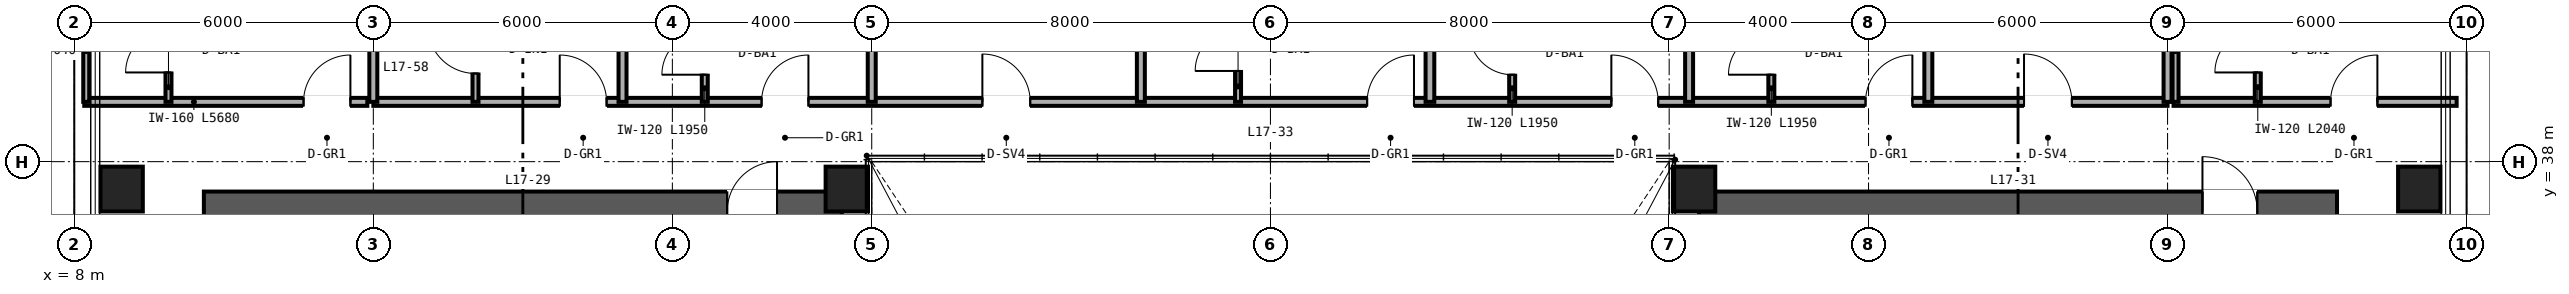
"""IFC4 building model, lengths in metres.
Left out: names, types, materials, properties, quantities, classifications, styles, units other than length and angle.
Written with IfcOpenShell. Run it as: python <this file> out.ifc"""

import sys

from ifc_helpers import new_model, si_unit, direction, frame, frame_2d, origin, origin_2d, place, context, subcontext, project, spatial, rectangle, hollow_rectangle, extrude, source, transform, mapped, element, fill, save


model = new_model("IFC4")
c1 = context("Model", 3, precision=1e-05, world=origin(), true_north=direction((0.0, 1.0)))
c2 = subcontext(c1, "Body", "Model", "MODEL_VIEW")
j1 = project(units=[si_unit("LENGTHUNIT", "METRE"), si_unit("PLANEANGLEUNIT", "RADIAN")], contexts=[c1])
p1 = place(None, origin())
s1 = spatial("IfcSite", under=j1, at=p1, CompositionType="ELEMENT")
p2 = place(p1, origin())
s2 = spatial("IfcBuilding", under=s1, at=p2, CompositionType="ELEMENT")
p3 = place(p2, frame((0.0, 0.0, 70.8)))
s3 = spatial("IfcBuildingStorey", under=s2, at=p3, CompositionType="ELEMENT", Elevation=70.8)
p4 = place(p3, frame((10.6, 37.0, 0.0), z_axis=(0.0, 0.0, 1.0), x_axis=(1.0, 0.0, 0.0)))
e1 = element("IfcWall", 1, at=p4, inside=s3, PredefinedType="SHEAR", context=c2, shape_type="SweptSolid", body=[
    extrude(rectangle(XDim=12.8, YDim=0.8, at=frame_2d((6.4, 0.0))), origin(), (0.0, 0.0, 1.0), 3.35),
])
p5 = place(p4, frame((10.5, 0.0, 0.0)))
e2 = element("IfcOpeningElement", 2, at=p5, cuts=e1, PredefinedType="OPENING", context=c2, shape_type="SweptSolid", body=[
    extrude(rectangle(XDim=1.0, YDim=2.15, at=frame_2d((0.5, 1.075))), frame((0.0, 0.41, 0.0), z_axis=(0.0, -1.0, 0.0), x_axis=(1.0, 0.0, 0.0)), (0.0, 0.0, 1.0), 0.82),
])
p6 = place(p3, frame((40.6, 37.0, 0.0), z_axis=(0.0, 0.0, 1.0), x_axis=(1.0, 0.0, 0.0)))
e3 = element("IfcWall", 3, at=p6, inside=s3, PredefinedType="SHEAR", context=c2, shape_type="SweptSolid", body=[
    extrude(rectangle(XDim=12.8, YDim=0.8, at=frame_2d((6.4, 0.0))), origin(), (0.0, 0.0, 1.0), 3.35),
])
p7 = place(p6, frame((10.1, 0.0, 0.0)))
e4 = element("IfcOpeningElement", 4, at=p7, cuts=e3, PredefinedType="OPENING", context=c2, shape_type="SweptSolid", body=[
    extrude(rectangle(XDim=1.1, YDim=2.15, at=frame_2d((0.55, 1.075))), frame((0.0, 0.41, 0.0), z_axis=(0.0, -1.0, 0.0), x_axis=(1.0, 0.0, 0.0)), (0.0, 0.0, 1.0), 0.82),
])
m1 = source(origin(), c2, "Body", "SweptSolid", [
    extrude(hollow_rectangle(XDim=0.85, YDim=0.9, WallThickness=0.04, at=origin_2d()), origin(), (0.0, 0.0, 1.0), 3.35),
])
for number, where, z_axis, x_axis in (
    (5, (8.95, 37.45, 0.0), (0.0, 0.0, 1.0), (1.0, 0.0, 0.0)),
    (6, (23.5, 37.45, 0.0), (0.0, 0.0, 1.0), (1.0, 0.0, 0.0)),
    (7, (40.5, 37.45, 0.0), (0.0, 0.0, 1.0), (1.0, 0.0, 0.0)),
    (8, (55.05, 37.45, 0.0), (0.0, 0.0, 1.0), (1.0, 0.0, 0.0)),
):
    element("IfcColumn", number, at=place(p3, frame(where, z_axis=z_axis, x_axis=x_axis)), inside=s3, PredefinedType="COLUMN", context=c2, shape_type="MappedRepresentation", body=[
        mapped(m1, transform((0.0, 0.0, 0.0), scale=1.0)),
    ])
p8 = place(p3, frame((8.2, 39.2, 0.0), z_axis=(0.0, 0.0, 1.0), x_axis=(1.0, 0.0, 0.0)))
e9 = element("IfcWall", 9, at=p8, inside=s3, PredefinedType="PARTITIONING", context=c2, shape_type="SweptSolid", body=[
    extrude(rectangle(XDim=5.68, YDim=0.16, at=frame_2d((2.84, 0.0))), origin(), (0.0, 0.0, 1.0), 3.35),
])
p9 = place(p8, frame((4.4, 0.0, 0.0)))
e10 = element("IfcOpeningElement", 10, at=p9, cuts=e9, PredefinedType="OPENING", context=c2, shape_type="SweptSolid", body=[
    extrude(rectangle(XDim=0.94, YDim=2.15, at=frame_2d((0.47, 1.075))), frame((0.0, 0.09, 0.0), z_axis=(0.0, -1.0, 0.0), x_axis=(1.0, 0.0, 0.0)), (0.0, 0.0, 1.0), 0.18),
])
p10 = place(p3, frame((9.89, 39.2, 0.0), z_axis=(0.0, 0.0, 1.0), x_axis=(0.0, 1.0, 0.0)))
e11 = element("IfcWall", 11, at=p10, inside=s3, PredefinedType="PARTITIONING", context=c2, shape_type="SweptSolid", body=[
    extrude(rectangle(XDim=2.04, YDim=0.12, at=frame_2d((1.02, 0.0))), origin(), (0.0, 0.0, 1.0), 3.35),
])
p11 = place(p10, frame((0.59, 0.0, 0.0)))
e12 = element("IfcOpeningElement", 12, at=p11, cuts=e11, PredefinedType="OPENING", context=c2, shape_type="SweptSolid", body=[
    extrude(rectangle(XDim=0.86, YDim=2.1, at=frame_2d((0.43, 1.05))), frame((0.0, 0.07, 0.0), z_axis=(0.0, -1.0, 0.0), x_axis=(1.0, 0.0, 0.0)), (0.0, 0.0, 1.0), 0.14),
])
p12 = place(p3, frame((8.24, 39.2, 0.0), z_axis=(0.0, 0.0, 1.0), x_axis=(0.0, 1.0, 0.0)))
e13 = element("IfcWall", 13, at=p12, inside=s3, PredefinedType="PARTITIONING", context=c2, shape_type="SweptSolid", body=[
    extrude(rectangle(XDim=2.04, YDim=0.12, at=frame_2d((1.02, 0.0))), origin(), (0.0, 0.0, 1.0), 3.35),
])
p13 = place(p3, frame((50.12, 39.2, 0.0), z_axis=(0.0, 0.0, 1.0), x_axis=(1.0, 0.0, 0.0)))
e14 = element("IfcWall", 14, at=p13, inside=s3, PredefinedType="PARTITIONING", context=c2, shape_type="SweptSolid", body=[
    extrude(rectangle(XDim=5.68, YDim=0.16, at=frame_2d((2.84, 0.0))), origin(), (0.0, 0.0, 1.0), 3.35),
])
p14 = place(p13, frame((3.15, 0.0, 0.0)))
e15 = element("IfcOpeningElement", 15, at=p14, cuts=e14, PredefinedType="OPENING", context=c2, shape_type="SweptSolid", body=[
    extrude(rectangle(XDim=0.94, YDim=2.15, at=frame_2d((0.47, 1.075))), frame((0.0, 0.09, 0.0), z_axis=(0.0, -1.0, 0.0), x_axis=(1.0, 0.0, 0.0)), (0.0, 0.0, 1.0), 0.18),
])
p15 = place(p3, frame((51.81, 39.2, 0.0), z_axis=(0.0, 0.0, 1.0), x_axis=(0.0, 1.0, 0.0)))
e16 = element("IfcWall", 16, at=p15, inside=s3, PredefinedType="PARTITIONING", context=c2, shape_type="SweptSolid", body=[
    extrude(rectangle(XDim=2.04, YDim=0.12, at=frame_2d((1.02, 0.0))), origin(), (0.0, 0.0, 1.0), 3.35),
])
p16 = place(p15, frame((0.59, 0.0, 0.0)))
e17 = element("IfcOpeningElement", 17, at=p16, cuts=e16, PredefinedType="OPENING", context=c2, shape_type="SweptSolid", body=[
    extrude(rectangle(XDim=0.86, YDim=2.1, at=frame_2d((0.43, 1.05))), frame((0.0, 0.07, 0.0), z_axis=(0.0, -1.0, 0.0), x_axis=(1.0, 0.0, 0.0)), (0.0, 0.0, 1.0), 0.14),
])
p17 = place(p3, frame((50.16, 39.2, 0.0), z_axis=(0.0, 0.0, 1.0), x_axis=(0.0, 1.0, 0.0)))
e18 = element("IfcWall", 18, at=p17, inside=s3, PredefinedType="PARTITIONING", context=c2, shape_type="SweptSolid", body=[
    extrude(rectangle(XDim=2.04, YDim=0.12, at=frame_2d((1.02, 0.0))), origin(), (0.0, 0.0, 1.0), 3.35),
])
p18 = place(p3, frame((14.0, 39.2, 0.0), z_axis=(0.0, 0.0, 1.0), x_axis=(1.0, 0.0, 0.0)))
e19 = element("IfcWall", 19, at=p18, inside=s3, PredefinedType="PARTITIONING", context=c2, shape_type="SweptSolid", body=[
    extrude(rectangle(XDim=36.0, YDim=0.16, at=frame_2d((18.0, 0.0))), origin(), (0.0, 0.0, 1.0), 2.571),
])
p19 = place(p18, frame((3.74, 0.0, 0.0)))
e20 = element("IfcOpeningElement", 20, at=p19, cuts=e19, PredefinedType="OPENING", context=c2, shape_type="SweptSolid", body=[
    extrude(rectangle(XDim=0.94, YDim=2.15, at=frame_2d((0.47, 1.075))), frame((0.0, 0.09, 0.0), z_axis=(0.0, -1.0, 0.0), x_axis=(1.0, 0.0, 0.0)), (0.0, 0.0, 1.0), 0.18),
])
p20 = place(p18, frame((7.79, 0.0, 0.0)))
e21 = element("IfcOpeningElement", 21, at=p20, cuts=e19, PredefinedType="OPENING", context=c2, shape_type="SweptSolid", body=[
    extrude(rectangle(XDim=0.94, YDim=2.15, at=frame_2d((0.47, 1.075))), frame((0.0, 0.09, 0.0), z_axis=(0.0, -1.0, 0.0), x_axis=(1.0, 0.0, 0.0)), (0.0, 0.0, 1.0), 0.18),
])
p21 = place(p18, frame((12.22, 0.0, 0.0)))
e22 = element("IfcOpeningElement", 22, at=p21, cuts=e19, PredefinedType="OPENING", context=c2, shape_type="SweptSolid", body=[
    extrude(rectangle(XDim=0.96, YDim=2.15, at=frame_2d((0.48, 1.075))), frame((0.0, 0.09, 0.0), z_axis=(0.0, -1.0, 0.0), x_axis=(1.0, 0.0, 0.0)), (0.0, 0.0, 1.0), 0.18),
])
p22 = place(p18, frame((19.94, 0.0, 0.0)))
e23 = element("IfcOpeningElement", 23, at=p22, cuts=e19, PredefinedType="OPENING", context=c2, shape_type="SweptSolid", body=[
    extrude(rectangle(XDim=0.94, YDim=2.15, at=frame_2d((0.47, 1.075))), frame((0.0, 0.09, 0.0), z_axis=(0.0, -1.0, 0.0), x_axis=(1.0, 0.0, 0.0)), (0.0, 0.0, 1.0), 0.18),
])
p23 = place(p18, frame((24.84, 0.0, 0.0)))
e24 = element("IfcOpeningElement", 24, at=p23, cuts=e19, PredefinedType="OPENING", context=c2, shape_type="SweptSolid", body=[
    extrude(rectangle(XDim=0.94, YDim=2.15, at=frame_2d((0.47, 1.075))), frame((0.0, 0.09, 0.0), z_axis=(0.0, -1.0, 0.0), x_axis=(1.0, 0.0, 0.0)), (0.0, 0.0, 1.0), 0.18),
])
p24 = place(p18, frame((29.94, 0.0, 0.0)))
e25 = element("IfcOpeningElement", 25, at=p24, cuts=e19, PredefinedType="OPENING", context=c2, shape_type="SweptSolid", body=[
    extrude(rectangle(XDim=0.94, YDim=2.15, at=frame_2d((0.47, 1.075))), frame((0.0, 0.09, 0.0), z_axis=(0.0, -1.0, 0.0), x_axis=(1.0, 0.0, 0.0)), (0.0, 0.0, 1.0), 0.18),
])
p25 = place(p18, frame((33.12, 0.0, 0.0)))
e26 = element("IfcOpeningElement", 26, at=p25, cuts=e19, PredefinedType="OPENING", context=c2, shape_type="SweptSolid", body=[
    extrude(rectangle(XDim=0.96, YDim=2.15, at=frame_2d((0.48, 1.075))), frame((0.0, 0.09, 0.0), z_axis=(0.0, -1.0, 0.0), x_axis=(1.0, 0.0, 0.0)), (0.0, 0.0, 1.0), 0.18),
])
for number, where, z_axis, x_axis in (
    (27, (14.0, 39.2, 0.0), (0.0, 0.0, 1.0), (0.0, 1.0, 0.0)),
    (28, (50.0, 39.2, 0.0), (0.0, 0.0, 1.0), (0.0, 1.0, 0.0)),
    (29, (19.0, 39.2, 0.0), (0.0, 0.0, 1.0), (0.0, 1.0, 0.0)),
):
    element("IfcWall", number, at=place(p3, frame(where, z_axis=z_axis, x_axis=x_axis)), inside=s3, PredefinedType="PARTITIONING", context=c2, shape_type="SweptSolid", body=[
        extrude(rectangle(XDim=10.44, YDim=0.16, at=frame_2d((5.22, 0.0))), origin(), (0.0, 0.0, 1.0), 2.657),
    ])
p26 = place(p3, frame((16.05, 39.2, 0.0), z_axis=(0.0, 0.0, 1.0), x_axis=(0.0, 1.0, 0.0)))
e30 = element("IfcWall", 30, at=p26, inside=s3, PredefinedType="PARTITIONING", context=c2, shape_type="SweptSolid", body=[
    extrude(rectangle(XDim=2.1, YDim=0.12, at=frame_2d((1.05, 0.0))), origin(), (0.0, 0.0, 1.0), 3.35),
])
p27 = place(p26, frame((0.57, 0.0, 0.0)))
e31 = element("IfcOpeningElement", 31, at=p27, cuts=e30, PredefinedType="OPENING", context=c2, shape_type="SweptSolid", body=[
    extrude(rectangle(XDim=0.96, YDim=2.15, at=frame_2d((0.48, 1.075))), frame((0.0, 0.07, 0.0), z_axis=(0.0, -1.0, 0.0), x_axis=(1.0, 0.0, 0.0)), (0.0, 0.0, 1.0), 0.14),
])
p28 = place(p3, frame((24.0, 39.2, 0.0), z_axis=(0.0, 0.0, 1.0), x_axis=(0.0, 1.0, 0.0)))
e32 = element("IfcWall", 32, at=p28, inside=s3, PredefinedType="PARTITIONING", context=c2, shape_type="SweptSolid", body=[
    extrude(rectangle(XDim=10.44, YDim=0.16, at=frame_2d((5.22, 0.0))), origin(), (0.0, 0.0, 1.0), 2.423),
])
p29 = place(p3, frame((20.65, 39.2, 0.0), z_axis=(0.0, 0.0, 1.0), x_axis=(0.0, 1.0, 0.0)))
e33 = element("IfcWall", 33, at=p29, inside=s3, PredefinedType="PARTITIONING", context=c2, shape_type="SweptSolid", body=[
    extrude(rectangle(XDim=1.95, YDim=0.12, at=frame_2d((0.975, 0.0))), origin(), (0.0, 0.0, 1.0), 3.35),
])
p30 = place(p29, frame((0.545, 0.0, 0.0)))
e34 = element("IfcOpeningElement", 34, at=p30, cuts=e33, PredefinedType="OPENING", context=c2, shape_type="SweptSolid", body=[
    extrude(rectangle(XDim=0.86, YDim=2.1, at=frame_2d((0.43, 1.05))), frame((0.0, 0.07, 0.0), z_axis=(0.0, -1.0, 0.0), x_axis=(1.0, 0.0, 0.0)), (0.0, 0.0, 1.0), 0.14),
])
p31 = place(p3, frame((29.4, 39.2, 0.0), z_axis=(0.0, 0.0, 1.0), x_axis=(0.0, 1.0, 0.0)))
e35 = element("IfcWall", 35, at=p31, inside=s3, PredefinedType="PARTITIONING", context=c2, shape_type="SweptSolid", body=[
    extrude(rectangle(XDim=10.44, YDim=0.16, at=frame_2d((5.22, 0.0))), origin(), (0.0, 0.0, 1.0), 2.423),
])
p32 = place(p3, frame((35.2, 39.2, 0.0), z_axis=(0.0, 0.0, 1.0), x_axis=(0.0, 1.0, 0.0)))
e36 = element("IfcWall", 36, at=p32, inside=s3, PredefinedType="PARTITIONING", context=c2, shape_type="SweptSolid", body=[
    extrude(rectangle(XDim=10.44, YDim=0.175, at=frame_2d((5.22, 0.0))), origin(), (0.0, 0.0, 1.0), 2.423),
])
p33 = place(p3, frame((31.35, 39.2, 0.0), z_axis=(0.0, 0.0, 1.0), x_axis=(0.0, 1.0, 0.0)))
e37 = element("IfcWall", 37, at=p33, inside=s3, PredefinedType="PARTITIONING", context=c2, shape_type="SweptSolid", body=[
    extrude(rectangle(XDim=2.1, YDim=0.12, at=frame_2d((1.05, 0.0))), origin(), (0.0, 0.0, 1.0), 3.35),
])
p34 = place(p33, frame((0.62, 0.0, 0.0)))
e38 = element("IfcOpeningElement", 38, at=p34, cuts=e37, PredefinedType="OPENING", context=c2, shape_type="SweptSolid", body=[
    extrude(rectangle(XDim=0.86, YDim=2.1, at=frame_2d((0.43, 1.05))), frame((0.0, 0.07, 0.0), z_axis=(0.0, -1.0, 0.0), x_axis=(1.0, 0.0, 0.0)), (0.0, 0.0, 1.0), 0.14),
])
p35 = place(p3, frame((40.4, 39.2, 0.0), z_axis=(0.0, 0.0, 1.0), x_axis=(0.0, 1.0, 0.0)))
e39 = element("IfcWall", 39, at=p35, inside=s3, PredefinedType="PARTITIONING", context=c2, shape_type="SweptSolid", body=[
    extrude(rectangle(XDim=10.44, YDim=0.16, at=frame_2d((5.22, 0.0))), origin(), (0.0, 0.0, 1.0), 2.423),
])
p36 = place(p3, frame((36.85, 39.2, 0.0), z_axis=(0.0, 0.0, 1.0), x_axis=(0.0, 1.0, 0.0)))
e40 = element("IfcWall", 40, at=p36, inside=s3, PredefinedType="PARTITIONING", context=c2, shape_type="SweptSolid", body=[
    extrude(rectangle(XDim=1.95, YDim=0.12, at=frame_2d((0.975, 0.0))), origin(), (0.0, 0.0, 1.0), 3.35),
])
p37 = place(p36, frame((0.545, 0.0, 0.0)))
e41 = element("IfcOpeningElement", 41, at=p37, cuts=e40, PredefinedType="OPENING", context=c2, shape_type="SweptSolid", body=[
    extrude(rectangle(XDim=0.86, YDim=2.1, at=frame_2d((0.43, 1.05))), frame((0.0, 0.07, 0.0), z_axis=(0.0, -1.0, 0.0), x_axis=(1.0, 0.0, 0.0)), (0.0, 0.0, 1.0), 0.14),
])
p38 = place(p3, frame((45.2, 39.2, 0.0), z_axis=(0.0, 0.0, 1.0), x_axis=(0.0, 1.0, 0.0)))
e42 = element("IfcWall", 42, at=p38, inside=s3, PredefinedType="PARTITIONING", context=c2, shape_type="SweptSolid", body=[
    extrude(rectangle(XDim=10.44, YDim=0.16, at=frame_2d((5.22, 0.0))), origin(), (0.0, 0.0, 1.0), 2.657),
])
p39 = place(p3, frame((42.05, 39.2, 0.0), z_axis=(0.0, 0.0, 1.0), x_axis=(0.0, 1.0, 0.0)))
e43 = element("IfcWall", 43, at=p39, inside=s3, PredefinedType="PARTITIONING", context=c2, shape_type="SweptSolid", body=[
    extrude(rectangle(XDim=1.95, YDim=0.12, at=frame_2d((0.975, 0.0))), origin(), (0.0, 0.0, 1.0), 3.35),
])
p40 = place(p39, frame((0.545, 0.0, 0.0)))
e44 = element("IfcOpeningElement", 44, at=p40, cuts=e43, PredefinedType="OPENING", context=c2, shape_type="SweptSolid", body=[
    extrude(rectangle(XDim=0.86, YDim=2.1, at=frame_2d((0.43, 1.05))), frame((0.0, 0.07, 0.0), z_axis=(0.0, -1.0, 0.0), x_axis=(1.0, 0.0, 0.0)), (0.0, 0.0, 1.0), 0.14),
])
m2 = source(origin(), c2, "Body", "SweptSolid", [
    extrude(rectangle(XDim=1.0, YDim=2.15, at=frame_2d((0.5, 1.075))), frame((0.0, 0.025, 0.0), z_axis=(0.0, -1.0, 0.0), x_axis=(1.0, 0.0, 0.0)), (0.0, 0.0, 1.0), 0.05),
])
p41 = place(p5, origin())
e45 = element("IfcDoor", 45, at=p41, inside=s3, OperationType="SINGLE_SWING_RIGHT", PredefinedType="DOOR", context=c2, shape_type="MappedRepresentation", body=[
    mapped(m2, transform((0.0, 0.0, 0.0), scale=1.0)),
])
fill(e2, e45)
m3 = source(origin(), c2, "Body", "SweptSolid", [
    extrude(rectangle(XDim=1.1, YDim=2.15, at=frame_2d((0.55, 1.075))), frame((0.0, 0.025, 0.0), z_axis=(0.0, -1.0, 0.0), x_axis=(1.0, 0.0, 0.0)), (0.0, 0.0, 1.0), 0.05),
])
p42 = place(p7, origin())
e46 = element("IfcDoor", 46, at=p42, inside=s3, OperationType="SINGLE_SWING_LEFT", PredefinedType="DOOR", context=c2, shape_type="MappedRepresentation", body=[
    mapped(m3, transform((0.0, 0.0, 0.0), scale=1.0)),
])
fill(e4, e46)
m4 = source(origin(), c2, "Body", "SweptSolid", [
    extrude(rectangle(XDim=0.86, YDim=2.1, at=frame_2d((0.43, 1.05))), frame((0.0, 0.025, 0.0), z_axis=(0.0, -1.0, 0.0), x_axis=(1.0, 0.0, 0.0)), (0.0, 0.0, 1.0), 0.05),
])
p43 = place(p11, origin())
e47 = element("IfcDoor", 47, at=p43, inside=s3, OperationType="SINGLE_SWING_LEFT", PredefinedType="DOOR", context=c2, shape_type="MappedRepresentation", body=[
    mapped(m4, transform((0.0, 0.0, 0.0), scale=1.0)),
])
fill(e12, e47)
m5 = source(origin(), c2, "Body", "SweptSolid", [
    extrude(rectangle(XDim=0.94, YDim=2.15, at=frame_2d((0.47, 1.075))), frame((0.0, 0.025, 0.0), z_axis=(0.0, -1.0, 0.0), x_axis=(1.0, 0.0, 0.0)), (0.0, 0.0, 1.0), 0.05),
])
p44 = place(p9, origin())
e48 = element("IfcDoor", 48, at=p44, inside=s3, OperationType="SINGLE_SWING_RIGHT", PredefinedType="DOOR", context=c2, shape_type="MappedRepresentation", body=[
    mapped(m5, transform((0.0, 0.0, 0.0), scale=1.0)),
])
fill(e10, e48)
p45 = place(p16, origin())
e49 = element("IfcDoor", 49, at=p45, inside=s3, OperationType="SINGLE_SWING_LEFT", PredefinedType="DOOR", context=c2, shape_type="MappedRepresentation", body=[
    mapped(m4, transform((0.0, 0.0, 0.0), scale=1.0)),
])
fill(e17, e49)
p46 = place(p14, origin())
e50 = element("IfcDoor", 50, at=p46, inside=s3, OperationType="SINGLE_SWING_RIGHT", PredefinedType="DOOR", context=c2, shape_type="MappedRepresentation", body=[
    mapped(m5, transform((0.0, 0.0, 0.0), scale=1.0)),
])
fill(e15, e50)
m6 = source(origin(), c2, "Body", "SweptSolid", [
    extrude(rectangle(XDim=0.96, YDim=2.15, at=frame_2d((0.48, 1.075))), frame((0.0, 0.025, 0.0), z_axis=(0.0, -1.0, 0.0), x_axis=(1.0, 0.0, 0.0)), (0.0, 0.0, 1.0), 0.05),
])
p47 = place(p27, origin())
e51 = element("IfcDoor", 51, at=p47, inside=s3, OperationType="SINGLE_SWING_RIGHT", PredefinedType="DOOR", context=c2, shape_type="MappedRepresentation", body=[
    mapped(m6, transform((0.0, 0.0, 0.0), scale=1.0)),
])
fill(e31, e51)
p48 = place(p30, origin())
e52 = element("IfcDoor", 52, at=p48, inside=s3, OperationType="SINGLE_SWING_LEFT", PredefinedType="DOOR", context=c2, shape_type="MappedRepresentation", body=[
    mapped(m4, transform((0.0, 0.0, 0.0), scale=1.0)),
])
fill(e34, e52)
p49 = place(p34, origin())
e53 = element("IfcDoor", 53, at=p49, inside=s3, OperationType="SINGLE_SWING_LEFT", PredefinedType="DOOR", context=c2, shape_type="MappedRepresentation", body=[
    mapped(m4, transform((0.0, 0.0, 0.0), scale=1.0)),
])
fill(e38, e53)
p50 = place(p37, origin())
e54 = element("IfcDoor", 54, at=p50, inside=s3, OperationType="SINGLE_SWING_RIGHT", PredefinedType="DOOR", context=c2, shape_type="MappedRepresentation", body=[
    mapped(m4, transform((0.0, 0.0, 0.0), scale=1.0)),
])
fill(e41, e54)
p51 = place(p40, origin())
e55 = element("IfcDoor", 55, at=p51, inside=s3, OperationType="SINGLE_SWING_LEFT", PredefinedType="DOOR", context=c2, shape_type="MappedRepresentation", body=[
    mapped(m4, transform((0.0, 0.0, 0.0), scale=1.0)),
])
fill(e44, e55)
p52 = place(p19, origin())
e56 = element("IfcDoor", 56, at=p52, inside=s3, OperationType="SINGLE_SWING_LEFT", PredefinedType="DOOR", context=c2, shape_type="MappedRepresentation", body=[
    mapped(m5, transform((0.0, 0.0, 0.0), scale=1.0)),
])
fill(e20, e56)
p53 = place(p20, origin())
e57 = element("IfcDoor", 57, at=p53, inside=s3, OperationType="SINGLE_SWING_RIGHT", PredefinedType="DOOR", context=c2, shape_type="MappedRepresentation", body=[
    mapped(m5, transform((0.0, 0.0, 0.0), scale=1.0)),
])
fill(e21, e57)
p54 = place(p21, origin())
e58 = element("IfcDoor", 58, at=p54, inside=s3, OperationType="SINGLE_SWING_LEFT", PredefinedType="DOOR", context=c2, shape_type="MappedRepresentation", body=[
    mapped(m6, transform((0.0, 0.0, 0.0), scale=1.0)),
])
fill(e22, e58)
p55 = place(p22, origin())
e59 = element("IfcDoor", 59, at=p55, inside=s3, OperationType="SINGLE_SWING_RIGHT", PredefinedType="DOOR", context=c2, shape_type="MappedRepresentation", body=[
    mapped(m5, transform((0.0, 0.0, 0.0), scale=1.0)),
])
fill(e23, e59)
p56 = place(p23, origin())
e60 = element("IfcDoor", 60, at=p56, inside=s3, OperationType="SINGLE_SWING_LEFT", PredefinedType="DOOR", context=c2, shape_type="MappedRepresentation", body=[
    mapped(m5, transform((0.0, 0.0, 0.0), scale=1.0)),
])
fill(e24, e60)
p57 = place(p24, origin())
e61 = element("IfcDoor", 61, at=p57, inside=s3, OperationType="SINGLE_SWING_RIGHT", PredefinedType="DOOR", context=c2, shape_type="MappedRepresentation", body=[
    mapped(m5, transform((0.0, 0.0, 0.0), scale=1.0)),
])
fill(e25, e61)
p58 = place(p25, origin())
e62 = element("IfcDoor", 62, at=p58, inside=s3, OperationType="SINGLE_SWING_LEFT", PredefinedType="DOOR", context=c2, shape_type="MappedRepresentation", body=[
    mapped(m6, transform((0.0, 0.0, 0.0), scale=1.0)),
])
fill(e26, e62)
save(model, sys.argv[1])
